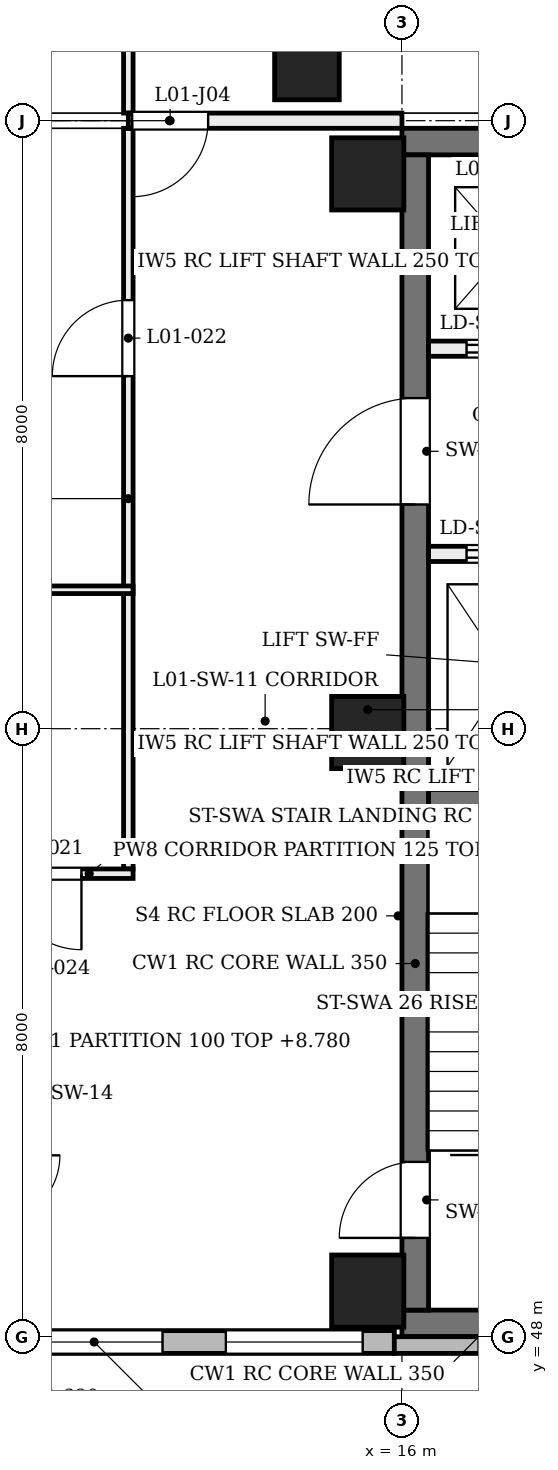
"""IFC4 building model, lengths in metres.
Left out: names, types, materials, properties, quantities, classifications, styles, units other than length and angle.
Written with IfcOpenShell. Run it as: python <this file> out.ifc"""

import sys

from ifc_helpers import new_model, si_unit, direction, frame, frame_2d, origin, origin_2d, place, context, subcontext, project, spatial, rectangle, extrude, element, fill, save


model = new_model("IFC4")
c1 = context("Model", 3, precision=1e-05, world=origin(), true_north=direction((0.0, 1.0)))
c2 = subcontext(c1, "Body", "Model", "MODEL_VIEW")
j1 = project(units=[si_unit("LENGTHUNIT", "METRE"), si_unit("PLANEANGLEUNIT", "RADIAN")], contexts=[c1])
p1 = place(None, origin())
s1 = spatial("IfcSite", under=j1, at=p1, CompositionType="ELEMENT")
p2 = place(p1, origin())
s2 = spatial("IfcBuilding", under=s1, at=p2, CompositionType="ELEMENT")
p3 = place(p2, frame((0.0, 0.0, 4.8)))
s3 = spatial("IfcBuildingStorey", under=s2, at=p3, CompositionType="ELEMENT", Elevation=4.8)
for number, where, z_axis, x_axis in (
    (1, (16.0, 48.175, 0.0), (0.0, 0.0, 1.0), (1.0, 0.0, 0.0)),
    (2, (16.0, 63.725, 0.0), (0.0, 0.0, 1.0), (1.0, 0.0, 0.0)),
):
    element("IfcWall", number, at=place(p3, frame(where, z_axis=z_axis, x_axis=x_axis)), inside=s3, PredefinedType="SHEAR", context=c2, shape_type="SweptSolid", body=[
        extrude(rectangle(XDim=7.9, YDim=0.35, at=frame_2d((3.95, 0.0))), origin(), (0.0, 0.0, 1.0), 4.58),
    ])
p4 = place(p3, frame((16.175, 48.35, 0.0), z_axis=(0.0, 0.0, 1.0), x_axis=(0.0, 1.0, 0.0)))
e3 = element("IfcWall", 3, at=p4, inside=s3, PredefinedType="SHEAR", context=c2, shape_type="SweptSolid", body=[
    extrude(rectangle(XDim=15.2, YDim=0.35, at=frame_2d((7.6, 0.0))), origin(), (0.0, 0.0, 1.0), 4.58),
])
p5 = place(p4, frame((0.95, 0.0, 0.0)))
e4 = element("IfcOpeningElement", 4, at=p5, cuts=e3, PredefinedType="OPENING", context=c2, shape_type="SweptSolid", body=[
    extrude(rectangle(XDim=1.0, YDim=2.1, at=frame_2d((0.5, 1.05))), frame((0.0, 0.185, 0.0), z_axis=(0.0, -1.0, 0.0), x_axis=(1.0, 0.0, 0.0)), (0.0, 0.0, 1.0), 0.37),
])
p6 = place(p4, frame((10.6, 0.0, 0.0)))
e5 = element("IfcOpeningElement", 5, at=p6, cuts=e3, PredefinedType="OPENING", context=c2, shape_type="SweptSolid", body=[
    extrude(rectangle(XDim=1.4, YDim=2.1, at=frame_2d((0.7, 1.05))), frame((0.0, 0.185, 0.0), z_axis=(0.0, -1.0, 0.0), x_axis=(1.0, 0.0, 0.0)), (0.0, 0.0, 1.0), 0.37),
])
for number, where, z_axis, x_axis in (
    (6, (15.55, 48.6, 0.0), (0.0, 0.0, 1.0), (1.0, 0.0, 0.0)),
    (7, (15.55, 55.95, 0.0), (0.0, 0.0, 1.0), (1.0, 0.0, 0.0)),
    (8, (15.55, 63.3, 0.0), (0.0, 0.0, 1.0), (1.0, 0.0, 0.0)),
):
    element("IfcColumn", number, at=place(p3, frame(where, z_axis=z_axis, x_axis=x_axis)), inside=s3, PredefinedType="COLUMN", context=c2, shape_type="SweptSolid", body=[
        extrude(rectangle(XDim=0.95, YDim=0.95, at=origin_2d()), origin(), (0.0, 0.0, 1.0), 4.8),
    ])
p7 = place(p3, frame((15.0, 64.7, 0.0), z_axis=(-0.203952265704, 0.0, 0.978980833987), x_axis=(0.0, -1.0, 0.0)))
e9 = element("IfcColumn", 9, at=p7, inside=s3, PredefinedType="COLUMN", context=c2, shape_type="SweptSolid", body=[
    extrude(rectangle(XDim=0.85, YDim=0.85, at=origin_2d()), origin(), (0.0, 0.0, 1.0), 4.903),
])
p8 = place(p3, frame((8.0, 47.93, 0.0), z_axis=(0.0, 0.0, 1.0), x_axis=(1.0, 0.0, 0.0)))
e10 = element("IfcWall", 10, at=p8, inside=s3, PredefinedType="SOLIDWALL", context=c2, shape_type="SweptSolid", body=[
    extrude(rectangle(XDim=7.9, YDim=0.3, at=frame_2d((3.95, 0.0))), origin(), (0.0, 0.0, 1.0), 3.9),
])
p9 = place(p8, frame((0.417, 0.0, 0.75)))
e11 = element("IfcOpeningElement", 11, at=p9, cuts=e10, PredefinedType="OPENING", context=c2, shape_type="SweptSolid", body=[
    extrude(rectangle(XDim=1.8, YDim=3.1, at=frame_2d((0.9, 1.55))), frame((0.0, 0.16, 0.0), z_axis=(0.0, -1.0, 0.0), x_axis=(1.0, 0.0, 0.0)), (0.0, 0.0, 1.0), 0.32),
])
p10 = place(p8, frame((3.05, 0.0, 0.75)))
e12 = element("IfcOpeningElement", 12, at=p10, cuts=e10, PredefinedType="OPENING", context=c2, shape_type="SweptSolid", body=[
    extrude(rectangle(XDim=1.8, YDim=3.1, at=frame_2d((0.9, 1.55))), frame((0.0, 0.16, 0.0), z_axis=(0.0, -1.0, 0.0), x_axis=(1.0, 0.0, 0.0)), (0.0, 0.0, 1.0), 0.32),
])
p11 = place(p8, frame((5.683, 0.0, 0.75)))
e13 = element("IfcOpeningElement", 13, at=p11, cuts=e10, PredefinedType="OPENING", context=c2, shape_type="SweptSolid", body=[
    extrude(rectangle(XDim=1.8, YDim=3.1, at=frame_2d((0.9, 1.55))), frame((0.0, 0.16, 0.0), z_axis=(0.0, -1.0, 0.0), x_axis=(1.0, 0.0, 0.0)), (0.0, 0.0, 1.0), 0.32),
])
p12 = place(p3, frame((15.9, 47.89, 0.0), z_axis=(0.0, 0.0, 1.0), x_axis=(1.0, 0.0, 0.0)))
e14 = element("IfcWall", 14, at=p12, inside=s3, PredefinedType="SOLIDWALL", context=c2, shape_type="SweptSolid", body=[
    extrude(rectangle(XDim=8.2, YDim=0.22, at=frame_2d((4.1, 0.0))), origin(), (0.0, 0.0, 1.0), 3.9),
])
p13 = place(p12, frame((1.108, 0.0, 0.9)))
e15 = element("IfcOpeningElement", 15, at=p13, cuts=e14, PredefinedType="OPENING", context=c2, shape_type="SweptSolid", body=[
    extrude(rectangle(XDim=0.45, YDim=2.6, at=frame_2d((0.225, 1.3))), frame((0.0, 0.12, 0.0), z_axis=(0.0, -1.0, 0.0), x_axis=(1.0, 0.0, 0.0)), (0.0, 0.0, 1.0), 0.24),
])
p14 = place(p12, frame((3.775, 0.0, 0.9)))
e16 = element("IfcOpeningElement", 16, at=p14, cuts=e14, PredefinedType="OPENING", context=c2, shape_type="SweptSolid", body=[
    extrude(rectangle(XDim=0.45, YDim=2.6, at=frame_2d((0.225, 1.3))), frame((0.0, 0.12, 0.0), z_axis=(0.0, -1.0, 0.0), x_axis=(1.0, 0.0, 0.0)), (0.0, 0.0, 1.0), 0.24),
])
p15 = place(p12, frame((6.442, 0.0, 0.9)))
e17 = element("IfcOpeningElement", 17, at=p15, cuts=e14, PredefinedType="OPENING", context=c2, shape_type="SweptSolid", body=[
    extrude(rectangle(XDim=0.45, YDim=2.6, at=frame_2d((0.225, 1.3))), frame((0.0, 0.12, 0.0), z_axis=(0.0, -1.0, 0.0), x_axis=(1.0, 0.0, 0.0)), (0.0, 0.0, 1.0), 0.24),
])
p16 = place(p3, frame((16.35, 55.075, 0.0), z_axis=(0.0, 0.0, 1.0), x_axis=(1.0, 0.0, 0.0)))
e18 = element("IfcWall", 18, at=p16, inside=s3, PredefinedType="SOLIDWALL", context=c2, shape_type="SweptSolid", body=[
    extrude(rectangle(XDim=3.1, YDim=0.25, at=frame_2d((1.55, 0.0))), origin(), (0.0, 0.0, 1.0), 4.55),
])
p17 = place(p3, frame((16.35, 58.3, 0.0), z_axis=(0.0, 0.0, 1.0), x_axis=(1.0, 0.0, 0.0)))
e19 = element("IfcWall", 19, at=p17, inside=s3, PredefinedType="SOLIDWALL", context=c2, shape_type="SweptSolid", body=[
    extrude(rectangle(XDim=7.2, YDim=0.2, at=frame_2d((3.6, 0.0))), origin(), (0.0, 0.0, 1.0), 4.55),
])
p18 = place(p17, frame((0.5, 0.0, 0.0)))
e20 = element("IfcOpeningElement", 20, at=p18, cuts=e19, PredefinedType="OPENING", context=c2, shape_type="SweptSolid", body=[
    extrude(rectangle(XDim=1.1, YDim=2.1, at=frame_2d((0.55, 1.05))), frame((0.0, 0.11, 0.0), z_axis=(0.0, -1.0, 0.0), x_axis=(1.0, 0.0, 0.0)), (0.0, 0.0, 1.0), 0.22),
])
p19 = place(p17, frame((5.6, 0.0, 0.0)))
e21 = element("IfcOpeningElement", 21, at=p19, cuts=e19, PredefinedType="OPENING", context=c2, shape_type="SweptSolid", body=[
    extrude(rectangle(XDim=1.1, YDim=2.1, at=frame_2d((0.55, 1.05))), frame((0.0, 0.11, 0.0), z_axis=(0.0, -1.0, 0.0), x_axis=(1.0, 0.0, 0.0)), (0.0, 0.0, 1.0), 0.22),
])
p20 = place(p17, frame((3.1, 0.0, 0.0)))
e22 = element("IfcOpeningElement", 22, at=p20, cuts=e19, PredefinedType="OPENING", context=c2, shape_type="SweptSolid", body=[
    extrude(rectangle(XDim=1.0, YDim=2.1, at=frame_2d((0.5, 1.05))), frame((0.0, 0.11, 0.0), z_axis=(0.0, -1.0, 0.0), x_axis=(1.0, 0.0, 0.0)), (0.0, 0.0, 1.0), 0.22),
])
p21 = place(p3, frame((16.35, 61.0, 0.0), z_axis=(0.0, 0.0, 1.0), x_axis=(1.0, 0.0, 0.0)))
e23 = element("IfcWall", 23, at=p21, inside=s3, PredefinedType="SOLIDWALL", context=c2, shape_type="SweptSolid", body=[
    extrude(rectangle(XDim=7.2, YDim=0.2, at=frame_2d((3.6, 0.0))), origin(), (0.0, 0.0, 1.0), 4.55),
])
p22 = place(p21, frame((0.5, 0.0, 0.0)))
e24 = element("IfcOpeningElement", 24, at=p22, cuts=e23, PredefinedType="OPENING", context=c2, shape_type="SweptSolid", body=[
    extrude(rectangle(XDim=1.1, YDim=2.1, at=frame_2d((0.55, 1.05))), frame((0.0, 0.11, 0.0), z_axis=(0.0, -1.0, 0.0), x_axis=(1.0, 0.0, 0.0)), (0.0, 0.0, 1.0), 0.22),
])
p23 = place(p21, frame((5.6, 0.0, 0.0)))
e25 = element("IfcOpeningElement", 25, at=p23, cuts=e23, PredefinedType="OPENING", context=c2, shape_type="SweptSolid", body=[
    extrude(rectangle(XDim=1.1, YDim=2.1, at=frame_2d((0.55, 1.05))), frame((0.0, 0.11, 0.0), z_axis=(0.0, -1.0, 0.0), x_axis=(1.0, 0.0, 0.0)), (0.0, 0.0, 1.0), 0.22),
])
p24 = place(p21, frame((3.1, 0.0, 0.0)))
e26 = element("IfcOpeningElement", 26, at=p24, cuts=e23, PredefinedType="OPENING", context=c2, shape_type="SweptSolid", body=[
    extrude(rectangle(XDim=1.0, YDim=2.1, at=frame_2d((0.5, 1.05))), frame((0.0, 0.11, 0.0), z_axis=(0.0, -1.0, 0.0), x_axis=(1.0, 0.0, 0.0)), (0.0, 0.0, 1.0), 0.22),
])
p25 = place(p3, frame((12.4, 54.154, 0.0), z_axis=(0.0, 0.0, 1.0), x_axis=(0.0, 1.0, 0.0)))
e27 = element("IfcWall", 27, at=p25, inside=s3, PredefinedType="PARTITIONING", context=c2, shape_type="SweptSolid", body=[
    extrude(rectangle(XDim=9.746, YDim=0.125, at=frame_2d((4.873, 0.0))), origin(), (0.0, 0.0, 1.0), 3.88),
])
p26 = place(p25, frame((6.485, 0.0, 0.0)))
e28 = element("IfcOpeningElement", 28, at=p26, cuts=e27, PredefinedType="OPENING", context=c2, shape_type="SweptSolid", body=[
    extrude(rectangle(XDim=1.0, YDim=2.1, at=frame_2d((0.5, 1.05))), frame((0.0, 0.073, 0.0), z_axis=(0.0, -1.0, 0.0), x_axis=(1.0, 0.0, 0.0)), (0.0, 0.0, 1.0), 0.145),
])
p27 = place(p3, frame((12.4, 64.1, 0.0), z_axis=(0.0, 0.0, 1.0), x_axis=(0.0, 1.0, 0.0)))
e29 = element("IfcWall", 29, at=p27, inside=s3, PredefinedType="PARTITIONING", context=c2, shape_type="SweptSolid", body=[
    extrude(rectangle(XDim=4.037, YDim=0.125, at=frame_2d((2.019, 0.0))), origin(), (0.0, 0.0, 1.0), 3.88),
])
p28 = place(p27, frame((1.825, 0.0, 0.0)))
e30 = element("IfcOpeningElement", 30, at=p28, cuts=e29, PredefinedType="OPENING", context=c2, shape_type="SweptSolid", body=[
    extrude(rectangle(XDim=1.0, YDim=2.1, at=frame_2d((0.5, 1.05))), frame((0.0, 0.073, 0.0), z_axis=(0.0, -1.0, 0.0), x_axis=(1.0, 0.0, 0.0)), (0.0, 0.0, 1.0), 0.145),
])
p29 = place(p3, frame((10.538, 54.092, 0.0), z_axis=(0.0, 0.0, 1.0), x_axis=(1.0, 0.0, 0.0)))
e31 = element("IfcWall", 31, at=p29, inside=s3, PredefinedType="PARTITIONING", context=c2, shape_type="SweptSolid", body=[
    extrude(rectangle(XDim=1.925, YDim=0.125, at=frame_2d((0.962, 0.0))), origin(), (0.0, 0.0, 1.0), 4.56),
])
p30 = place(p29, frame((0.246, 0.0, 0.0)))
e32 = element("IfcOpeningElement", 32, at=p30, cuts=e31, PredefinedType="OPENING", context=c2, shape_type="SweptSolid", body=[
    extrude(rectangle(XDim=1.0, YDim=2.1, at=frame_2d((0.5, 1.05))), frame((0.0, 0.073, 0.0), z_axis=(0.0, -1.0, 0.0), x_axis=(1.0, 0.0, 0.0)), (0.0, 0.0, 1.0), 0.145),
])
p31 = place(p3, frame((8.3, 57.828, 0.0), z_axis=(0.0, 0.0, 1.0), x_axis=(1.0, 0.0, 0.0)))
e33 = element("IfcWall", 33, at=p31, inside=s3, PredefinedType="PARTITIONING", context=c2, shape_type="SweptSolid", body=[
    extrude(rectangle(XDim=4.162, YDim=0.1, at=frame_2d((2.081, 0.0))), origin(), (0.0, 0.0, 1.0), 3.98),
])
p32 = place(p3, frame((12.4, 64.0, 0.0), z_axis=(0.0, 0.0, 1.0), x_axis=(1.0, 0.0, 0.0)))
e34 = element("IfcWall", 34, at=p32, inside=s3, PredefinedType="PARTITIONING", context=c2, shape_type="SweptSolid", body=[
    extrude(rectangle(XDim=3.6, YDim=0.2, at=frame_2d((1.8, 0.0))), origin(), (0.0, 0.0, 1.0), 3.88),
])
p33 = place(p32, frame((0.05, 0.0, 0.0)))
e35 = element("IfcOpeningElement", 35, at=p33, cuts=e34, PredefinedType="OPENING", context=c2, shape_type="SweptSolid", body=[
    extrude(rectangle(XDim=1.0, YDim=2.1, at=frame_2d((0.5, 1.05))), frame((0.0, 0.11, 0.0), z_axis=(0.0, -1.0, 0.0), x_axis=(1.0, 0.0, 0.0)), (0.0, 0.0, 1.0), 0.22),
])
p34 = place(p10, origin())
e36 = element("IfcWindow", 36, at=p34, inside=s3, PartitioningType="SINGLE_PANEL", PredefinedType="WINDOW", context=c2, shape_type="SweptSolid", body=[
    extrude(rectangle(XDim=1.8, YDim=3.1, at=frame_2d((0.9, 1.55))), frame((0.0, 0.03, 0.0), z_axis=(0.0, -1.0, 0.0), x_axis=(1.0, 0.0, 0.0)), (0.0, 0.0, 1.0), 0.06),
])
fill(e12, e36)
p35 = place(p11, origin())
e37 = element("IfcWindow", 37, at=p35, inside=s3, PartitioningType="SINGLE_PANEL", PredefinedType="WINDOW", context=c2, shape_type="SweptSolid", body=[
    extrude(rectangle(XDim=1.8, YDim=3.1, at=frame_2d((0.9, 1.55))), frame((0.0, 0.03, 0.0), z_axis=(0.0, -1.0, 0.0), x_axis=(1.0, 0.0, 0.0)), (0.0, 0.0, 1.0), 0.06),
])
fill(e13, e37)
p36 = place(p5, origin())
e38 = element("IfcDoor", 38, at=p36, inside=s3, OperationType="SINGLE_SWING_LEFT", PredefinedType="DOOR", context=c2, shape_type="SweptSolid", body=[
    extrude(rectangle(XDim=1.0, YDim=2.1, at=frame_2d((0.5, 1.05))), frame((0.0, 0.025, 0.0), z_axis=(0.0, -1.0, 0.0), x_axis=(1.0, 0.0, 0.0)), (0.0, 0.0, 1.0), 0.05),
])
fill(e4, e38)
p37 = place(p18, origin())
e39 = element("IfcDoor", 39, at=p37, inside=s3, OperationType="DOUBLE_DOOR_SLIDING", PredefinedType="DOOR", context=c2, shape_type="SweptSolid", body=[
    extrude(rectangle(XDim=1.1, YDim=2.1, at=frame_2d((0.55, 1.05))), frame((0.0, 0.025, 0.0), z_axis=(0.0, -1.0, 0.0), x_axis=(1.0, 0.0, 0.0)), (0.0, 0.0, 1.0), 0.05),
])
fill(e20, e39)
p38 = place(p22, frame((1.1, 0.0, 0.0), z_axis=(0.0, 0.0, 1.0), x_axis=(-1.0, 0.0, 0.0)))
e40 = element("IfcDoor", 40, at=p38, inside=s3, OperationType="DOUBLE_DOOR_SLIDING", PredefinedType="DOOR", context=c2, shape_type="SweptSolid", body=[
    extrude(rectangle(XDim=1.1, YDim=2.1, at=frame_2d((0.55, 1.05))), frame((0.0, 0.025, 0.0), z_axis=(0.0, -1.0, 0.0), x_axis=(1.0, 0.0, 0.0)), (0.0, 0.0, 1.0), 0.05),
])
fill(e24, e40)
p39 = place(p6, origin())
e41 = element("IfcDoor", 41, at=p39, inside=s3, OperationType="SINGLE_SWING_LEFT", PredefinedType="DOOR", context=c2, shape_type="SweptSolid", body=[
    extrude(rectangle(XDim=1.4, YDim=2.1, at=frame_2d((0.7, 1.05))), frame((0.0, 0.025, 0.0), z_axis=(0.0, -1.0, 0.0), x_axis=(1.0, 0.0, 0.0)), (0.0, 0.0, 1.0), 0.05),
])
fill(e5, e41)
p40 = place(p30, origin())
e42 = element("IfcDoor", 42, at=p40, inside=s3, OperationType="SINGLE_SWING_RIGHT", PredefinedType="DOOR", context=c2, shape_type="SweptSolid", body=[
    extrude(rectangle(XDim=1.0, YDim=2.1, at=frame_2d((0.5, 1.05))), frame((0.0, 0.025, 0.0), z_axis=(0.0, -1.0, 0.0), x_axis=(1.0, 0.0, 0.0)), (0.0, 0.0, 1.0), 0.05),
])
fill(e32, e42)
p41 = place(p26, origin())
e43 = element("IfcDoor", 43, at=p41, inside=s3, OperationType="SINGLE_SWING_LEFT", PredefinedType="DOOR", context=c2, shape_type="SweptSolid", body=[
    extrude(rectangle(XDim=1.0, YDim=2.1, at=frame_2d((0.5, 1.05))), frame((0.0, 0.025, 0.0), z_axis=(0.0, -1.0, 0.0), x_axis=(1.0, 0.0, 0.0)), (0.0, 0.0, 1.0), 0.05),
])
fill(e28, e43)
p42 = place(p33, frame((1.0, 0.0, 0.0), z_axis=(0.0, 0.0, 1.0), x_axis=(-1.0, 0.0, 0.0)))
e44 = element("IfcDoor", 44, at=p42, inside=s3, OperationType="SINGLE_SWING_LEFT", PredefinedType="DOOR", context=c2, shape_type="SweptSolid", body=[
    extrude(rectangle(XDim=1.0, YDim=2.1, at=frame_2d((0.5, 1.05))), frame((0.0, 0.025, 0.0), z_axis=(0.0, -1.0, 0.0), x_axis=(1.0, 0.0, 0.0)), (0.0, 0.0, 1.0), 0.05),
])
fill(e35, e44)
save(model, sys.argv[1])
